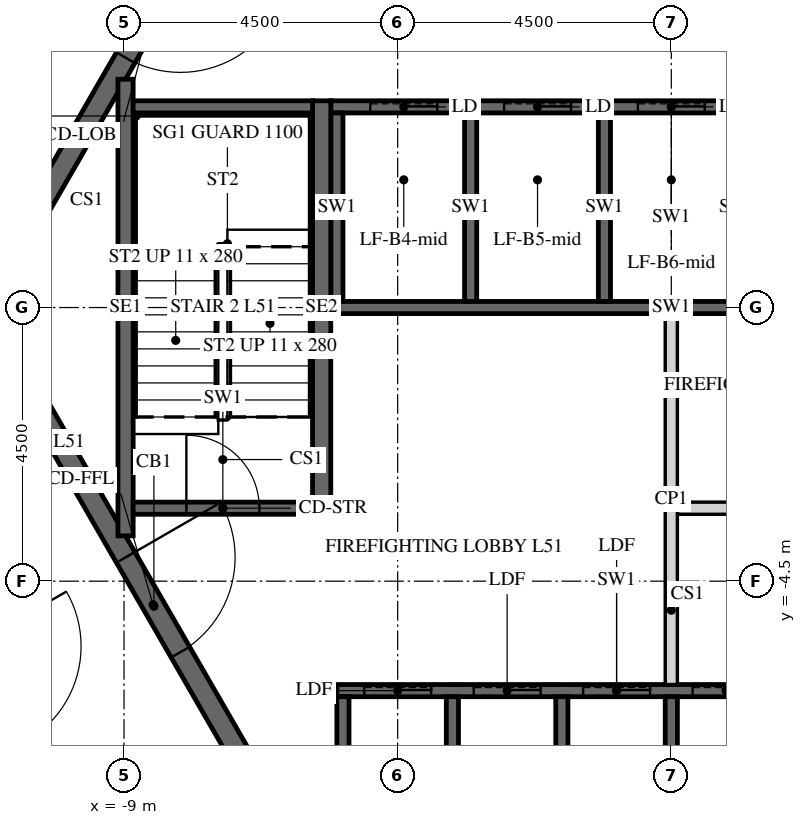
"""IFC4 building model, lengths in metres.
Left out: names, types, materials, properties, quantities, classifications, styles, units other than length and angle.
Written with IfcOpenShell. Run it as: python <this file> out.ifc"""

import sys

from ifc_helpers import new_model, si_unit, direction, frame, frame_2d, origin, place, context, subcontext, project, spatial, polyline, rectangle, outline, extrude, element, fill, save


model = new_model("IFC4")
c1 = context("Model", 3, precision=1e-05, world=origin(), true_north=direction((0.0, 1.0)))
c2 = subcontext(c1, "Body", "Model", "MODEL_VIEW")
j1 = project(units=[si_unit("LENGTHUNIT", "METRE"), si_unit("PLANEANGLEUNIT", "RADIAN")], contexts=[c1])
p1 = place(None, origin())
s1 = spatial("IfcSite", under=j1, at=p1, CompositionType="ELEMENT")
p2 = place(p1, origin())
s2 = spatial("IfcBuilding", under=s1, at=p2, CompositionType="ELEMENT")
p3 = place(p2, frame((0.0, 0.0, 215.1)))
s3 = spatial("IfcBuildingStorey", under=s2, at=p3, CompositionType="ELEMENT", Elevation=215.1)
p4 = place(p3, frame((-7.361, 12.75, -0.15), z_axis=(0.0, 0.0, 1.0), x_axis=(-0.50000571537, -0.866022103989, 0.0)))
e1 = element("IfcWall", 1, at=p4, inside=s3, PredefinedType="SHEAR", context=c2, shape_type="SweptSolid", body=[
    extrude(outline(polyline([(-0.144, -0.25), (14.867, -0.25), (14.578, 0.25), (0.144, 0.25), (-0.144, -0.25)])), origin(), (0.0, 0.0, 1.0), 3.9),
])
p5 = place(p4, frame((6.49, 0.0, 0.15)))
e2 = element("IfcOpeningElement", 2, at=p5, cuts=e1, PredefinedType="OPENING", context=c2, shape_type="SweptSolid", body=[
    extrude(rectangle(XDim=1.8, YDim=2.4, at=frame_2d((0.9, 1.2))), frame((0.0, 0.26, 0.0), z_axis=(0.0, -1.0, 0.0), x_axis=(1.0, 0.0, 0.0)), (0.0, 0.0, 1.0), 0.52),
])
p6 = place(p3, frame((-14.722, 0.0, -0.15), z_axis=(0.0, 0.0, 1.0), x_axis=(0.50000571537, -0.866022103989, 0.0)))
e3 = element("IfcWall", 3, at=p6, inside=s3, PredefinedType="SHEAR", context=c2, shape_type="SweptSolid", body=[
    extrude(outline(polyline([(-0.144, -0.25), (14.867, -0.25), (14.578, 0.25), (0.144, 0.25), (-0.144, -0.25)])), origin(), (0.0, 0.0, 1.0), 3.9),
])
p7 = place(p6, frame((6.432, 0.0, 0.15)))
e4 = element("IfcOpeningElement", 4, at=p7, cuts=e3, PredefinedType="OPENING", context=c2, shape_type="SweptSolid", body=[
    extrude(rectangle(XDim=1.8, YDim=2.4, at=frame_2d((0.9, 1.2))), frame((0.0, 0.26, 0.0), z_axis=(0.0, -1.0, 0.0), x_axis=(1.0, 0.0, 0.0)), (0.0, 0.0, 1.0), 0.52),
])
p8 = place(p3, frame((-5.673, 9.825, -0.15), z_axis=(0.0, 0.0, 1.0), x_axis=(-0.499995046907, -0.866028263435, 0.0)))
e5 = element("IfcWall", 5, at=p8, inside=s3, PredefinedType="SHEAR", context=c2, shape_type="SweptSolid", body=[
    extrude(outline(polyline([(-0.101, -0.175), (11.446, -0.175), (11.244, 0.175), (0.101, 0.175), (-0.101, -0.175)])), origin(), (0.0, 0.0, 1.0), 3.9),
])
p9 = place(p8, frame((4.801, 0.0, 0.15)))
e6 = element("IfcOpeningElement", 6, at=p9, cuts=e5, PredefinedType="OPENING", context=c2, shape_type="SweptSolid", body=[
    extrude(rectangle(XDim=1.8, YDim=2.4, at=frame_2d((0.9, 1.2))), frame((0.0, 0.185, 0.0), z_axis=(0.0, -1.0, 0.0), x_axis=(1.0, 0.0, 0.0)), (0.0, 0.0, 1.0), 0.37),
])
p10 = place(p3, frame((-11.345, 0.0, -0.15), z_axis=(0.0, 0.0, 1.0), x_axis=(0.499995046907, -0.866028263435, 0.0)))
e7 = element("IfcWall", 7, at=p10, inside=s3, PredefinedType="SHEAR", context=c2, shape_type="SweptSolid", body=[
    extrude(outline(polyline([(-0.101, -0.175), (11.446, -0.175), (11.244, 0.175), (0.101, 0.175), (-0.101, -0.175)])), origin(), (0.0, 0.0, 1.0), 3.9),
])
p11 = place(p10, frame((4.744, 0.0, 0.15)))
e8 = element("IfcOpeningElement", 8, at=p11, cuts=e7, PredefinedType="OPENING", context=c2, shape_type="SweptSolid", body=[
    extrude(rectangle(XDim=1.8, YDim=2.4, at=frame_2d((0.9, 1.2))), frame((0.0, 0.185, 0.0), z_axis=(0.0, -1.0, 0.0), x_axis=(1.0, 0.0, 0.0)), (0.0, 0.0, 1.0), 0.37),
])
p12 = place(p3, frame((-5.6, 3.3, -0.25), z_axis=(0.0, 0.0, 1.0), x_axis=(1.0, 0.0, 0.0)))
e9 = element("IfcWall", 9, at=p12, inside=s3, PredefinedType="SHEAR", context=c2, shape_type="SweptSolid", body=[
    extrude(rectangle(XDim=11.2, YDim=0.2, at=frame_2d((5.6, 0.0))), origin(), (0.0, 0.0, 1.0), 3.9),
])
p13 = place(p12, frame((0.65, 0.0, 0.25)))
e10 = element("IfcOpeningElement", 10, at=p13, cuts=e9, PredefinedType="OPENING", context=c2, shape_type="SweptSolid", body=[
    extrude(rectangle(XDim=1.1, YDim=2.1, at=frame_2d((0.55, 1.05))), frame((0.0, 0.11, 0.0), z_axis=(0.0, -1.0, 0.0), x_axis=(1.0, 0.0, 0.0)), (0.0, 0.0, 1.0), 0.22),
])
p14 = place(p12, frame((2.85, 0.0, 0.25)))
e11 = element("IfcOpeningElement", 11, at=p14, cuts=e9, PredefinedType="OPENING", context=c2, shape_type="SweptSolid", body=[
    extrude(rectangle(XDim=1.1, YDim=2.1, at=frame_2d((0.55, 1.05))), frame((0.0, 0.11, 0.0), z_axis=(0.0, -1.0, 0.0), x_axis=(1.0, 0.0, 0.0)), (0.0, 0.0, 1.0), 0.22),
])
p15 = place(p12, frame((5.05, 0.0, 0.25)))
e12 = element("IfcOpeningElement", 12, at=p15, cuts=e9, PredefinedType="OPENING", context=c2, shape_type="SweptSolid", body=[
    extrude(rectangle(XDim=1.1, YDim=2.1, at=frame_2d((0.55, 1.05))), frame((0.0, 0.11, 0.0), z_axis=(0.0, -1.0, 0.0), x_axis=(1.0, 0.0, 0.0)), (0.0, 0.0, 1.0), 0.22),
])
p16 = place(p12, frame((7.25, 0.0, 0.25)))
e13 = element("IfcOpeningElement", 13, at=p16, cuts=e9, PredefinedType="OPENING", context=c2, shape_type="SweptSolid", body=[
    extrude(rectangle(XDim=1.1, YDim=2.1, at=frame_2d((0.55, 1.05))), frame((0.0, 0.11, 0.0), z_axis=(0.0, -1.0, 0.0), x_axis=(1.0, 0.0, 0.0)), (0.0, 0.0, 1.0), 0.22),
])
p17 = place(p12, frame((9.45, 0.0, 0.25)))
e14 = element("IfcOpeningElement", 14, at=p17, cuts=e9, PredefinedType="OPENING", context=c2, shape_type="SweptSolid", body=[
    extrude(rectangle(XDim=1.1, YDim=2.1, at=frame_2d((0.55, 1.05))), frame((0.0, 0.11, 0.0), z_axis=(0.0, -1.0, 0.0), x_axis=(1.0, 0.0, 0.0)), (0.0, 0.0, 1.0), 0.22),
])
p18 = place(p3, frame((-5.6, 0.0, -0.25), z_axis=(0.0, 0.0, 1.0), x_axis=(1.0, 0.0, 0.0)))
e15 = element("IfcWall", 15, at=p18, inside=s3, PredefinedType="SHEAR", context=c2, shape_type="SweptSolid", body=[
    extrude(rectangle(XDim=11.2, YDim=0.2, at=frame_2d((5.6, 0.0))), origin(), (0.0, 0.0, 1.0), 3.9),
])
for number, where, z_axis, x_axis in (
    (16, (-5.5, 0.1, -0.25), (0.0, 0.0, 1.0), (0.0, 1.0, 0.0)),
    (17, (-3.3, 0.1, -0.25), (0.0, 0.0, 1.0), (0.0, 1.0, 0.0)),
    (18, (-1.1, 0.1, -0.25), (0.0, 0.0, 1.0), (0.0, 1.0, 0.0)),
):
    element("IfcWall", number, at=place(p3, frame(where, z_axis=z_axis, x_axis=x_axis)), inside=s3, PredefinedType="SHEAR", context=c2, shape_type="SweptSolid", body=[
        extrude(rectangle(XDim=3.1, YDim=0.2, at=frame_2d((1.55, 0.0))), origin(), (0.0, 0.0, 1.0), 3.9),
    ])
p19 = place(p3, frame((-5.5, -6.3, -0.25), z_axis=(0.0, 0.0, 1.0), x_axis=(1.0, 0.0, 0.0)))
e19 = element("IfcWall", 19, at=p19, inside=s3, PredefinedType="SHEAR", context=c2, shape_type="SweptSolid", body=[
    extrude(rectangle(XDim=9.2, YDim=0.2, at=frame_2d((4.6, 0.0))), origin(), (0.0, 0.0, 1.0), 3.9),
])
p20 = place(p19, frame((0.45, 0.0, 0.25)))
e20 = element("IfcOpeningElement", 20, at=p20, cuts=e19, PredefinedType="OPENING", context=c2, shape_type="SweptSolid", body=[
    extrude(rectangle(XDim=1.1, YDim=2.1, at=frame_2d((0.55, 1.05))), frame((0.0, 0.11, 0.0), z_axis=(0.0, -1.0, 0.0), x_axis=(1.0, 0.0, 0.0)), (0.0, 0.0, 1.0), 0.22),
])
p21 = place(p19, frame((2.25, 0.0, 0.25)))
e21 = element("IfcOpeningElement", 21, at=p21, cuts=e19, PredefinedType="OPENING", context=c2, shape_type="SweptSolid", body=[
    extrude(rectangle(XDim=1.1, YDim=2.1, at=frame_2d((0.55, 1.05))), frame((0.0, 0.11, 0.0), z_axis=(0.0, -1.0, 0.0), x_axis=(1.0, 0.0, 0.0)), (0.0, 0.0, 1.0), 0.22),
])
p22 = place(p19, frame((4.05, 0.0, 0.25)))
e22 = element("IfcOpeningElement", 22, at=p22, cuts=e19, PredefinedType="OPENING", context=c2, shape_type="SweptSolid", body=[
    extrude(rectangle(XDim=1.1, YDim=2.1, at=frame_2d((0.55, 1.05))), frame((0.0, 0.11, 0.0), z_axis=(0.0, -1.0, 0.0), x_axis=(1.0, 0.0, 0.0)), (0.0, 0.0, 1.0), 0.22),
])
p23 = place(p19, frame((5.85, 0.0, 0.25)))
e23 = element("IfcOpeningElement", 23, at=p23, cuts=e19, PredefinedType="OPENING", context=c2, shape_type="SweptSolid", body=[
    extrude(rectangle(XDim=1.1, YDim=2.1, at=frame_2d((0.55, 1.05))), frame((0.0, 0.11, 0.0), z_axis=(0.0, -1.0, 0.0), x_axis=(1.0, 0.0, 0.0)), (0.0, 0.0, 1.0), 0.22),
])
p24 = place(p19, frame((7.65, 0.0, 0.25)))
e24 = element("IfcOpeningElement", 24, at=p24, cuts=e19, PredefinedType="OPENING", context=c2, shape_type="SweptSolid", body=[
    extrude(rectangle(XDim=1.1, YDim=2.1, at=frame_2d((0.55, 1.05))), frame((0.0, 0.11, 0.0), z_axis=(0.0, -1.0, 0.0), x_axis=(1.0, 0.0, 0.0)), (0.0, 0.0, 1.0), 0.22),
])
for number, where, z_axis, x_axis in (
    (25, (-5.4, -9.3, -0.25), (0.0, 0.0, 1.0), (0.0, 1.0, 0.0)),
    (26, (-3.6, -9.3, -0.25), (0.0, 0.0, 1.0), (0.0, 1.0, 0.0)),
    (27, (-1.8, -9.3, -0.25), (0.0, 0.0, 1.0), (0.0, 1.0, 0.0)),
    (28, (0.0, -9.3, -0.25), (0.0, 0.0, 1.0), (0.0, 1.0, 0.0)),
):
    element("IfcWall", number, at=place(p3, frame(where, z_axis=z_axis, x_axis=x_axis)), inside=s3, PredefinedType="SHEAR", context=c2, shape_type="SweptSolid", body=[
        extrude(rectangle(XDim=2.9, YDim=0.2, at=frame_2d((1.45, 0.0))), origin(), (0.0, 0.0, 1.0), 3.9),
    ])
p25 = place(p3, frame((0.1, -3.3, 0.0), z_axis=(0.0, 0.0, 1.0), x_axis=(1.0, 0.0, 0.0)))
e29 = element("IfcWall", 29, at=p25, inside=s3, PredefinedType="PARTITIONING", context=c2, shape_type="SweptSolid", body=[
    extrude(rectangle(XDim=5.5, YDim=0.2, at=frame_2d((2.75, 0.0))), origin(), (0.0, 0.0, 1.0), 3.65),
])
p26 = place(p25, frame((2.3, 0.0, 0.0)))
e30 = element("IfcOpeningElement", 30, at=p26, cuts=e29, PredefinedType="OPENING", context=c2, shape_type="SweptSolid", body=[
    extrude(rectangle(XDim=0.9, YDim=2.1, at=frame_2d((0.45, 1.05))), frame((0.0, 0.11, 0.0), z_axis=(0.0, -1.0, 0.0), x_axis=(1.0, 0.0, 0.0)), (0.0, 0.0, 1.0), 0.22),
])
p27 = place(p3, frame((0.0, -6.2, 0.0), z_axis=(0.0, 0.0, 1.0), x_axis=(0.0, 1.0, 0.0)))
e31 = element("IfcWall", 31, at=p27, inside=s3, PredefinedType="PARTITIONING", context=c2, shape_type="SweptSolid", body=[
    extrude(rectangle(XDim=6.1, YDim=0.2, at=frame_2d((3.05, 0.0))), origin(), (0.0, 0.0, 1.0), 3.65),
])
p28 = place(p3, frame((-5.75, -3.4, -0.25), z_axis=(0.0, 0.0, 1.0), x_axis=(0.0, 1.0, 0.0)))
e32 = element("IfcWall", 32, at=p28, inside=s3, PredefinedType="SHEAR", context=c2, shape_type="SweptSolid", body=[
    extrude(rectangle(XDim=6.8, YDim=0.3, at=frame_2d((3.4, 0.0))), origin(), (0.0, 0.0, 1.0), 3.9),
])
p29 = place(p3, frame((-8.975, -3.755, -0.25), z_axis=(0.0, 0.0, 1.0), x_axis=(0.0, 1.0, 0.0)))
e33 = element("IfcWall", 33, at=p29, inside=s3, PredefinedType="SHEAR", context=c2, shape_type="SweptSolid", body=[
    extrude(rectangle(XDim=7.51, YDim=0.25, at=frame_2d((3.755, 0.0))), origin(), (0.0, 0.0, 1.0), 3.9),
])
p30 = place(p3, frame((-8.85, 3.3, -0.25), z_axis=(0.0, 0.0, 1.0), x_axis=(1.0, 0.0, 0.0)))
e34 = element("IfcWall", 34, at=p30, inside=s3, PredefinedType="SHEAR", context=c2, shape_type="SweptSolid", body=[
    extrude(rectangle(XDim=2.95, YDim=0.2, at=frame_2d((1.475, 0.0))), origin(), (0.0, 0.0, 1.0), 3.9),
])
p31 = place(p3, frame((-8.85, -3.3, -0.25), z_axis=(0.0, 0.0, 1.0), x_axis=(1.0, 0.0, 0.0)))
e35 = element("IfcWall", 35, at=p31, inside=s3, PredefinedType="SHEAR", context=c2, shape_type="SweptSolid", body=[
    extrude(rectangle(XDim=2.95, YDim=0.2, at=frame_2d((1.475, 0.0))), origin(), (0.0, 0.0, 1.0), 3.9),
])
p32 = place(p31, frame((0.875, 0.0, 0.25)))
e36 = element("IfcOpeningElement", 36, at=p32, cuts=e35, PredefinedType="OPENING", context=c2, shape_type="SweptSolid", body=[
    extrude(rectangle(XDim=1.2, YDim=2.4, at=frame_2d((0.6, 1.2))), frame((0.0, 0.11, 0.0), z_axis=(0.0, -1.0, 0.0), x_axis=(1.0, 0.0, 0.0)), (0.0, 0.0, 1.0), 0.22),
])
p33 = place(p3, frame((-8.588, 14.725, 0.0), z_axis=(0.0, 0.0, 1.0), x_axis=(-0.499999403554, -0.866025748143, 0.0)))
e37 = element("IfcWall", 37, at=p33, inside=s3, PredefinedType="PARTITIONING", context=c2, shape_type="SweptSolid", body=[
    extrude(rectangle(XDim=14.549, YDim=0.15, at=frame_2d((7.275, 0.0))), origin(), (0.0, 0.0, 1.0), 2.988),
])
p34 = place(p33, frame((1.781, 0.0, 0.0)))
e38 = element("IfcOpeningElement", 38, at=p34, cuts=e37, PredefinedType="OPENING", context=c2, shape_type="SweptSolid", body=[
    extrude(rectangle(XDim=1.0, YDim=2.1, at=frame_2d((0.5, 1.05))), frame((0.0, 0.085, 0.0), z_axis=(0.0, -1.0, 0.0), x_axis=(1.0, 0.0, 0.0)), (0.0, 0.0, 1.0), 0.17),
])
p35 = place(p33, frame((8.705, 0.0, 0.0)))
e39 = element("IfcOpeningElement", 39, at=p35, cuts=e37, PredefinedType="OPENING", context=c2, shape_type="SweptSolid", body=[
    extrude(rectangle(XDim=1.0, YDim=2.1, at=frame_2d((0.5, 1.05))), frame((0.0, 0.085, 0.0), z_axis=(0.0, -1.0, 0.0), x_axis=(1.0, 0.0, 0.0)), (0.0, 0.0, 1.0), 0.17),
])
p36 = place(p3, frame((-15.863, -2.125, 0.0), z_axis=(0.0, 0.0, 1.0), x_axis=(0.500008833422, -0.866020303746, 0.0)))
e40 = element("IfcWall", 40, at=p36, inside=s3, PredefinedType="PARTITIONING", context=c2, shape_type="SweptSolid", body=[
    extrude(rectangle(XDim=14.636, YDim=0.15, at=frame_2d((7.318, 0.0))), origin(), (0.0, 0.0, 1.0), 2.988),
])
p37 = place(p36, frame((4.909, 0.0, 0.0)))
e41 = element("IfcOpeningElement", 41, at=p37, cuts=e40, PredefinedType="OPENING", context=c2, shape_type="SweptSolid", body=[
    extrude(rectangle(XDim=1.0, YDim=2.1, at=frame_2d((0.5, 1.05))), frame((0.0, 0.085, 0.0), z_axis=(0.0, -1.0, 0.0), x_axis=(1.0, 0.0, 0.0)), (0.0, 0.0, 1.0), 0.17),
])
p38 = place(p36, frame((13.486, 0.0, 0.0)))
e42 = element("IfcOpeningElement", 42, at=p38, cuts=e40, PredefinedType="OPENING", context=c2, shape_type="SweptSolid", body=[
    extrude(rectangle(XDim=1.0, YDim=2.1, at=frame_2d((0.5, 1.05))), frame((0.0, 0.085, 0.0), z_axis=(0.0, -1.0, 0.0), x_axis=(1.0, 0.0, 0.0)), (0.0, 0.0, 1.0), 0.17),
])
p39 = place(p9, origin())
e43 = element("IfcDoor", 43, at=p39, inside=s3, OperationType="DOUBLE_DOOR_SINGLE_SWING", PredefinedType="DOOR", context=c2, shape_type="SweptSolid", body=[
    extrude(rectangle(XDim=1.8, YDim=2.4, at=frame_2d((0.9, 1.2))), frame((0.0, 0.025, 0.0), z_axis=(0.0, -1.0, 0.0), x_axis=(1.0, 0.0, 0.0)), (0.0, 0.0, 1.0), 0.05),
])
fill(e6, e43)
p40 = place(p11, origin())
e44 = element("IfcDoor", 44, at=p40, inside=s3, OperationType="DOUBLE_DOOR_SINGLE_SWING", PredefinedType="DOOR", context=c2, shape_type="SweptSolid", body=[
    extrude(rectangle(XDim=1.8, YDim=2.4, at=frame_2d((0.9, 1.2))), frame((0.0, 0.025, 0.0), z_axis=(0.0, -1.0, 0.0), x_axis=(1.0, 0.0, 0.0)), (0.0, 0.0, 1.0), 0.05),
])
fill(e8, e44)
p41 = place(p32, origin())
e45 = element("IfcDoor", 45, at=p41, inside=s3, OperationType="SINGLE_SWING_LEFT", PredefinedType="DOOR", context=c2, shape_type="SweptSolid", body=[
    extrude(rectangle(XDim=1.2, YDim=2.4, at=frame_2d((0.6, 1.2))), frame((0.0, 0.025, 0.0), z_axis=(0.0, -1.0, 0.0), x_axis=(1.0, 0.0, 0.0)), (0.0, 0.0, 1.0), 0.05),
])
fill(e36, e45)
p42 = place(p13, origin())
e46 = element("IfcDoor", 46, at=p42, inside=s3, OperationType="SLIDING_TO_LEFT", PredefinedType="DOOR", context=c2, shape_type="SweptSolid", body=[
    extrude(rectangle(XDim=1.1, YDim=2.1, at=frame_2d((0.55, 1.05))), frame((0.0, 0.025, 0.0), z_axis=(0.0, -1.0, 0.0), x_axis=(1.0, 0.0, 0.0)), (0.0, 0.0, 1.0), 0.05),
])
fill(e10, e46)
p43 = place(p14, origin())
e47 = element("IfcDoor", 47, at=p43, inside=s3, OperationType="SLIDING_TO_LEFT", PredefinedType="DOOR", context=c2, shape_type="SweptSolid", body=[
    extrude(rectangle(XDim=1.1, YDim=2.1, at=frame_2d((0.55, 1.05))), frame((0.0, 0.025, 0.0), z_axis=(0.0, -1.0, 0.0), x_axis=(1.0, 0.0, 0.0)), (0.0, 0.0, 1.0), 0.05),
])
fill(e11, e47)
p44 = place(p15, origin())
e48 = element("IfcDoor", 48, at=p44, inside=s3, OperationType="SLIDING_TO_LEFT", PredefinedType="DOOR", context=c2, shape_type="SweptSolid", body=[
    extrude(rectangle(XDim=1.1, YDim=2.1, at=frame_2d((0.55, 1.05))), frame((0.0, 0.025, 0.0), z_axis=(0.0, -1.0, 0.0), x_axis=(1.0, 0.0, 0.0)), (0.0, 0.0, 1.0), 0.05),
])
fill(e12, e48)
p45 = place(p20, origin())
e49 = element("IfcDoor", 49, at=p45, inside=s3, OperationType="SLIDING_TO_LEFT", PredefinedType="DOOR", context=c2, shape_type="SweptSolid", body=[
    extrude(rectangle(XDim=1.1, YDim=2.1, at=frame_2d((0.55, 1.05))), frame((0.0, 0.025, 0.0), z_axis=(0.0, -1.0, 0.0), x_axis=(1.0, 0.0, 0.0)), (0.0, 0.0, 1.0), 0.05),
])
fill(e20, e49)
p46 = place(p21, origin())
e50 = element("IfcDoor", 50, at=p46, inside=s3, OperationType="SLIDING_TO_LEFT", PredefinedType="DOOR", context=c2, shape_type="SweptSolid", body=[
    extrude(rectangle(XDim=1.1, YDim=2.1, at=frame_2d((0.55, 1.05))), frame((0.0, 0.025, 0.0), z_axis=(0.0, -1.0, 0.0), x_axis=(1.0, 0.0, 0.0)), (0.0, 0.0, 1.0), 0.05),
])
fill(e21, e50)
p47 = place(p22, origin())
e51 = element("IfcDoor", 51, at=p47, inside=s3, OperationType="SLIDING_TO_LEFT", PredefinedType="DOOR", context=c2, shape_type="SweptSolid", body=[
    extrude(rectangle(XDim=1.1, YDim=2.1, at=frame_2d((0.55, 1.05))), frame((0.0, 0.025, 0.0), z_axis=(0.0, -1.0, 0.0), x_axis=(1.0, 0.0, 0.0)), (0.0, 0.0, 1.0), 0.05),
])
fill(e22, e51)
p48 = place(p23, origin())
e52 = element("IfcDoor", 52, at=p48, inside=s3, OperationType="SLIDING_TO_LEFT", PredefinedType="DOOR", context=c2, shape_type="SweptSolid", body=[
    extrude(rectangle(XDim=1.1, YDim=2.1, at=frame_2d((0.55, 1.05))), frame((0.0, 0.025, 0.0), z_axis=(0.0, -1.0, 0.0), x_axis=(1.0, 0.0, 0.0)), (0.0, 0.0, 1.0), 0.05),
])
fill(e23, e52)
save(model, sys.argv[1])
